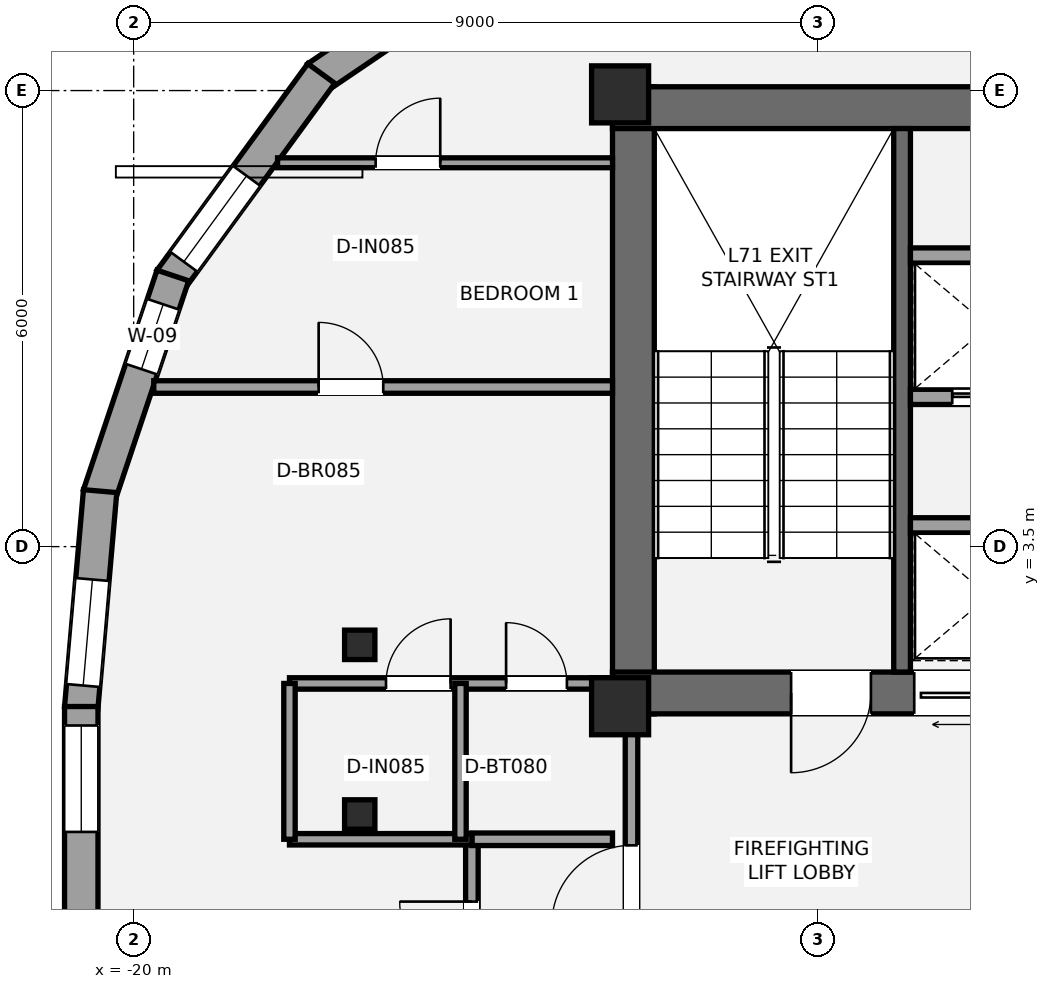
"""IFC4 building model, lengths in metres.
Left out: names, types, materials, properties, quantities, classifications, styles, units other than length and angle.
Written with IfcOpenShell. Run it as: python <this file> out.ifc"""

import sys

from ifc_helpers import new_model, si_unit, direction, frame, frame_2d, origin, origin_2d, place, context, subcontext, project, spatial, rectangle, i_section, extrude, element, fill, save


model = new_model("IFC4")
c1 = context("Model", 3, precision=1e-05, world=origin(), true_north=direction((0.0, 1.0)))
c2 = subcontext(c1, "Body", "Model", "MODEL_VIEW")
j1 = project(units=[si_unit("LENGTHUNIT", "METRE"), si_unit("PLANEANGLEUNIT", "RADIAN")], contexts=[c1])
p1 = place(None, origin())
s1 = spatial("IfcSite", under=j1, at=p1, CompositionType="ELEMENT")
p2 = place(p1, origin())
s2 = spatial("IfcBuilding", under=s1, at=p2, CompositionType="ELEMENT")
p3 = place(p2, frame((0.0, 0.0, 250.95)))
s3 = spatial("IfcBuildingStorey", under=s2, at=p3, CompositionType="ELEMENT", Elevation=250.95)
p4 = place(p3, frame((-13.425, 1.3, 0.0), z_axis=(0.0, 0.0, 1.0), x_axis=(0.0, 1.0, 0.0)))
e1 = element("IfcWall", 1, at=p4, inside=s3, PredefinedType="SHEAR", context=c2, shape_type="SweptSolid", body=[
    extrude(rectangle(XDim=8.25, YDim=0.55, at=frame_2d((4.125, 0.0))), origin(), (0.0, 0.0, 1.0), 3.15),
])
p5 = place(p3, frame((-13.7, 9.275, 0.0), z_axis=(0.0, 0.0, 1.0), x_axis=(1.0, 0.0, 0.0)))
e2 = element("IfcWall", 2, at=p5, inside=s3, PredefinedType="SHEAR", context=c2, shape_type="SweptSolid", body=[
    extrude(rectangle(XDim=9.175, YDim=0.55, at=frame_2d((4.587, 0.0))), origin(), (0.0, 0.0, 1.0), 3.15),
])
p6 = place(p3, frame((-4.925, 1.575, 0.0), z_axis=(0.0, 0.0, 1.0), x_axis=(-1.0, 0.0, 0.0)))
e3 = element("IfcWall", 3, at=p6, inside=s3, PredefinedType="SHEAR", context=c2, shape_type="SweptSolid", body=[
    extrude(rectangle(XDim=8.775, YDim=0.55, at=frame_2d((4.387, 0.0))), origin(), (0.0, 0.0, 1.0), 3.15),
])
p7 = place(p6, frame((5.375, 0.0, 0.0)))
e4 = element("IfcOpeningElement", 4, at=p7, cuts=e3, PredefinedType="OPENING", context=c2, shape_type="SweptSolid", body=[
    extrude(rectangle(XDim=1.05, YDim=2.15, at=frame_2d((0.525, 1.075))), frame((0.0, 0.285, 0.0), z_axis=(0.0, -1.0, 0.0), x_axis=(1.0, 0.0, 0.0)), (0.0, 0.0, 1.0), 0.57),
])
p8 = place(p6, frame((3.705, 0.0, 0.0)))
e5 = element("IfcOpeningElement", 5, at=p8, cuts=e3, PredefinedType="OPENING", context=c2, shape_type="SweptSolid", body=[
    extrude(rectangle(XDim=1.1, YDim=2.2, at=frame_2d((0.55, 1.1))), frame((0.0, 0.285, 0.0), z_axis=(0.0, -1.0, 0.0), x_axis=(1.0, 0.0, 0.0)), (0.0, 0.0, 1.0), 0.57),
])
p9 = place(p3, frame((-9.89, 1.85, 0.0), z_axis=(0.0, 0.0, 1.0), x_axis=(0.0, 1.0, 0.0)))
e6 = element("IfcWall", 6, at=p9, inside=s3, PredefinedType="SHEAR", context=c2, shape_type="SweptSolid", body=[
    extrude(rectangle(XDim=7.15, YDim=0.22, at=frame_2d((3.575, 0.0))), origin(), (0.0, 0.0, 1.0), 3.15),
])
for number, where, z_axis, x_axis in (
    (7, (-13.6, 1.4, 0.0), (0.0, 0.0, 1.0), (1.0, 0.0, 0.0)),
    (8, (-13.6, 9.45, 0.0), (0.0, 0.0, 1.0), (1.0, 0.0, 0.0)),
):
    element("IfcColumn", number, at=place(p3, frame(where, z_axis=z_axis, x_axis=x_axis)), inside=s3, PredefinedType="PILASTER", context=c2, shape_type="SweptSolid", body=[
        extrude(rectangle(XDim=0.75, YDim=0.75, at=origin_2d()), origin(), (0.0, 0.0, 1.0), 3.15),
    ])
for number, where, z_axis, x_axis in (
    (9, (-17.026, 2.208, 0.0), (0.0, 0.0, 1.0), (1.0, 0.0, 0.0)),
    (10, (-17.026, -0.024, 0.0), (0.0, 0.0, 1.0), (1.0, 0.0, 0.0)),
):
    element("IfcColumn", number, at=place(p3, frame(where, z_axis=z_axis, x_axis=x_axis)), inside=s3, PredefinedType="COLUMN", context=c2, shape_type="SweptSolid", body=[
        extrude(i_section(OverallWidth=0.399, OverallDepth=0.387, WebThickness=0.021, FlangeThickness=0.033, at=origin_2d()), origin(), (0.0, 0.0, 1.0), 3.15),
    ])
p10 = place(p3, frame((-17.586, 9.672, 0.0), z_axis=(0.0, 0.0, 1.0), x_axis=(0.827707997274, 0.56115904274, 0.0)))
e11 = element("IfcWall", 11, at=p10, inside=s3, PredefinedType="STANDARD", context=c2, shape_type="SweptSolid", body=[
    extrude(rectangle(XDim=3.837, YDim=0.44, at=frame_2d((1.918, 0.0))), origin(), (0.0, 0.0, 1.0), 2.336),
])
p11 = place(p10, frame((1.44, 0.0, 0.55)))
e12 = element("IfcOpeningElement", 12, at=p11, cuts=e11, PredefinedType="OPENING", context=c2, shape_type="SweptSolid", body=[
    extrude(rectangle(XDim=1.75, YDim=1.55, at=frame_2d((0.875, 0.775))), frame((0.0, 0.23, 0.0), z_axis=(0.0, -1.0, 0.0), x_axis=(1.0, 0.0, 0.0)), (0.0, 0.0, 1.0), 0.46),
])
p12 = place(p3, frame((-19.515, 7.007, 0.0), z_axis=(0.0, 0.0, 1.0), x_axis=(0.589698134284, 0.807623743102, 0.0)))
e13 = element("IfcWall", 13, at=p12, inside=s3, PredefinedType="STANDARD", context=c2, shape_type="SweptSolid", body=[
    extrude(rectangle(XDim=3.364, YDim=0.44, at=frame_2d((1.682, 0.0))), origin(), (0.0, 0.0, 1.0), 2.336),
])
p13 = place(p12, frame((0.298, 0.0, 0.58)))
e14 = element("IfcOpeningElement", 14, at=p13, cuts=e13, PredefinedType="OPENING", context=c2, shape_type="SweptSolid", body=[
    extrude(rectangle(XDim=1.4, YDim=1.55, at=frame_2d((0.7, 0.775))), frame((0.0, 0.23, 0.0), z_axis=(0.0, -1.0, 0.0), x_axis=(1.0, 0.0, 0.0)), (0.0, 0.0, 1.0), 0.46),
])
p14 = place(p3, frame((-20.452, 4.179, 0.0), z_axis=(0.0, 0.0, 1.0), x_axis=(0.317622332961, 0.948217302945, 0.0)))
e15 = element("IfcWall", 15, at=p14, inside=s3, PredefinedType="STANDARD", context=c2, shape_type="SweptSolid", body=[
    extrude(rectangle(XDim=3.045, YDim=0.44, at=frame_2d((1.523, 0.0))), origin(), (0.0, 0.0, 1.0), 2.336),
])
p15 = place(p14, frame((1.746, 0.0, 0.58)))
e16 = element("IfcOpeningElement", 16, at=p15, cuts=e15, PredefinedType="OPENING", context=c2, shape_type="SweptSolid", body=[
    extrude(rectangle(XDim=0.9, YDim=1.35, at=frame_2d((0.45, 0.675))), frame((0.0, 0.23, 0.0), z_axis=(0.0, -1.0, 0.0), x_axis=(1.0, 0.0, 0.0)), (0.0, 0.0, 1.0), 0.46),
])
p16 = place(p3, frame((-20.69, 1.377, 0.0), z_axis=(0.0, 0.0, 1.0), x_axis=(0.086868726907, 0.996219767062, 0.0)))
e17 = element("IfcWall", 17, at=p16, inside=s3, PredefinedType="STANDARD", context=c2, shape_type="SweptSolid", body=[
    extrude(rectangle(XDim=2.864, YDim=0.44, at=frame_2d((1.432, 0.0))), origin(), (0.0, 0.0, 1.0), 2.336),
])
p17 = place(p16, frame((0.297, 0.0, 0.58)))
e18 = element("IfcOpeningElement", 18, at=p17, cuts=e17, PredefinedType="OPENING", context=c2, shape_type="SweptSolid", body=[
    extrude(rectangle(XDim=1.4, YDim=1.55, at=frame_2d((0.7, 0.775))), frame((0.0, 0.23, 0.0), z_axis=(0.0, -1.0, 0.0), x_axis=(1.0, 0.0, 0.0)), (0.0, 0.0, 1.0), 0.46),
])
p18 = place(p3, frame((-20.689, -1.396, 0.0), z_axis=(0.0, 0.0, 1.0), x_axis=(0.0, 1.0, 0.0)))
e19 = element("IfcWall", 19, at=p18, inside=s3, PredefinedType="STANDARD", context=c2, shape_type="SweptSolid", body=[
    extrude(rectangle(XDim=2.792, YDim=0.44, at=frame_2d((1.396, 0.0))), origin(), (0.0, 0.0, 1.0), 2.336),
])
p19 = place(p18, frame((1.143, 0.0, 0.55)))
e20 = element("IfcOpeningElement", 20, at=p19, cuts=e19, PredefinedType="OPENING", context=c2, shape_type="SweptSolid", body=[
    extrude(rectangle(XDim=1.4, YDim=1.55, at=frame_2d((0.7, 0.775))), frame((0.0, 0.23, 0.0), z_axis=(0.0, -1.0, 0.0), x_axis=(1.0, 0.0, 0.0)), (0.0, 0.0, 1.0), 0.46),
])
p20 = place(p3, frame((-13.45, -2.15, 0.0), z_axis=(0.0, 0.0, 1.0), x_axis=(0.0, 1.0, 0.0)))
e21 = element("IfcWall", 21, at=p20, inside=s3, PredefinedType="PARTITIONING", context=c2, shape_type="SweptSolid", body=[
    extrude(rectangle(XDim=3.5, YDim=0.165, at=frame_2d((1.75, 0.0))), origin(), (0.0, 0.0, 1.0), 2.423),
])
p21 = place(p20, frame((0.67, 0.0, 0.0)))
e22 = element("IfcOpeningElement", 22, at=p21, cuts=e21, PredefinedType="OPENING", context=c2, shape_type="SweptSolid", body=[
    extrude(rectangle(XDim=1.05, YDim=2.15, at=frame_2d((0.525, 1.075))), frame((0.0, 0.093, 0.0), z_axis=(0.0, -1.0, 0.0), x_axis=(1.0, 0.0, 0.0)), (0.0, 0.0, 1.0), 0.185),
])
p22 = place(p3, frame((-9.78, 3.78, 0.0), z_axis=(0.0, 0.0, 1.0), x_axis=(1.0, 0.0, 0.0)))
e23 = element("IfcWall", 23, at=p22, inside=s3, PredefinedType="SOLIDWALL", context=c2, shape_type="SweptSolid", body=[
    extrude(rectangle(XDim=4.305, YDim=0.2, at=frame_2d((2.152, 0.0))), origin(), (0.0, 0.0, 1.0), 2.97),
])
p23 = place(p22, frame((2.72, 0.0, 0.0)))
e24 = element("IfcOpeningElement", 24, at=p23, cuts=e23, PredefinedType="OPENING", context=c2, shape_type="SweptSolid", body=[
    extrude(rectangle(XDim=1.1, YDim=2.2, at=frame_2d((0.55, 1.1))), frame((0.0, 0.11, 0.0), z_axis=(0.0, -1.0, 0.0), x_axis=(1.0, 0.0, 0.0)), (0.0, 0.0, 1.0), 0.22),
])
p24 = place(p3, frame((-9.78, 5.47, 0.0), z_axis=(0.0, 0.0, 1.0), x_axis=(1.0, 0.0, 0.0)))
e25 = element("IfcWall", 25, at=p24, inside=s3, PredefinedType="SOLIDWALL", context=c2, shape_type="SweptSolid", body=[
    extrude(rectangle(XDim=4.305, YDim=0.2, at=frame_2d((2.152, 0.0))), origin(), (0.0, 0.0, 1.0), 2.97),
])
p25 = place(p24, frame((0.55, 0.0, 0.0)))
e26 = element("IfcOpeningElement", 26, at=p25, cuts=e25, PredefinedType="OPENING", context=c2, shape_type="SweptSolid", body=[
    extrude(rectangle(XDim=1.1, YDim=2.2, at=frame_2d((0.55, 1.1))), frame((0.0, 0.11, 0.0), z_axis=(0.0, -1.0, 0.0), x_axis=(1.0, 0.0, 0.0)), (0.0, 0.0, 1.0), 0.22),
])
p26 = place(p24, frame((2.72, 0.0, 0.0)))
e27 = element("IfcOpeningElement", 27, at=p26, cuts=e25, PredefinedType="OPENING", context=c2, shape_type="SweptSolid", body=[
    extrude(rectangle(XDim=1.1, YDim=2.2, at=frame_2d((0.55, 1.1))), frame((0.0, 0.11, 0.0), z_axis=(0.0, -1.0, 0.0), x_axis=(1.0, 0.0, 0.0)), (0.0, 0.0, 1.0), 0.22),
])
p27 = place(p3, frame((-9.78, 7.33, 0.0), z_axis=(0.0, 0.0, 1.0), x_axis=(1.0, 0.0, 0.0)))
e28 = element("IfcWall", 28, at=p27, inside=s3, PredefinedType="SOLIDWALL", context=c2, shape_type="SweptSolid", body=[
    extrude(rectangle(XDim=4.305, YDim=0.2, at=frame_2d((2.152, 0.0))), origin(), (0.0, 0.0, 1.0), 2.97),
])
p28 = place(p3, frame((-15.55, -3.95, 0.0), z_axis=(0.0, 0.0, 1.0), x_axis=(0.0, 1.0, 0.0)))
e29 = element("IfcWall", 29, at=p28, inside=s3, PredefinedType="PARTITIONING", context=c2, shape_type="SweptSolid", body=[
    extrude(rectangle(XDim=3.6, YDim=0.165, at=frame_2d((1.8, 0.0))), origin(), (0.0, 0.0, 1.0), 2.357),
])
p29 = place(p28, frame((1.83, 0.0, 0.0)))
e30 = element("IfcOpeningElement", 30, at=p29, cuts=e29, PredefinedType="OPENING", context=c2, shape_type="SweptSolid", body=[
    extrude(rectangle(XDim=0.95, YDim=2.15, at=frame_2d((0.475, 1.075))), frame((0.0, 0.093, 0.0), z_axis=(0.0, -1.0, 0.0), x_axis=(1.0, 0.0, 0.0)), (0.0, 0.0, 1.0), 0.185),
])
p30 = place(p3, frame((-15.55, -0.35, 0.0), z_axis=(0.0, 0.0, 1.0), x_axis=(1.0, 0.0, 0.0)))
e31 = element("IfcWall", 31, at=p30, inside=s3, PredefinedType="PARTITIONING", context=c2, shape_type="SweptSolid", body=[
    extrude(rectangle(XDim=1.85, YDim=0.165, at=frame_2d((0.925, 0.0))), origin(), (0.0, 0.0, 1.0), 2.423),
])
p31 = place(p3, frame((-19.736, 5.6, 0.0), z_axis=(0.0, 0.0, 1.0), x_axis=(1.0, 0.0, 0.0)))
e32 = element("IfcWall", 32, at=p31, inside=s3, PredefinedType="PARTITIONING", context=c2, shape_type="SweptSolid", body=[
    extrude(rectangle(XDim=6.036, YDim=0.165, at=frame_2d((3.018, 0.0))), origin(), (0.0, 0.0, 1.0), 2.423),
])
p32 = place(p31, frame((2.169, 0.0, 0.0)))
e33 = element("IfcOpeningElement", 33, at=p32, cuts=e32, PredefinedType="OPENING", context=c2, shape_type="SweptSolid", body=[
    extrude(rectangle(XDim=0.85, YDim=2.1, at=frame_2d((0.425, 1.05))), frame((0.0, 0.093, 0.0), z_axis=(0.0, -1.0, 0.0), x_axis=(1.0, 0.0, 0.0)), (0.0, 0.0, 1.0), 0.185),
])
p33 = place(p3, frame((-17.95, 1.7, 0.0), z_axis=(0.0, 0.0, 1.0), x_axis=(1.0, 0.0, 0.0)))
e34 = element("IfcWall", 34, at=p33, inside=s3, PredefinedType="PLUMBINGWALL", context=c2, shape_type="SweptSolid", body=[
    extrude(rectangle(XDim=4.25, YDim=0.15, at=frame_2d((2.125, 0.0))), origin(), (0.0, 0.0, 1.0), 2.423),
])
p34 = place(p33, frame((2.85, 0.0, 0.0)))
e35 = element("IfcOpeningElement", 35, at=p34, cuts=e34, PredefinedType="OPENING", context=c2, shape_type="SweptSolid", body=[
    extrude(rectangle(XDim=0.8, YDim=2.1, at=frame_2d((0.4, 1.05))), frame((0.0, 0.085, 0.0), z_axis=(0.0, -1.0, 0.0), x_axis=(1.0, 0.0, 0.0)), (0.0, 0.0, 1.0), 0.17),
])
p35 = place(p33, frame((1.27, 0.0, 0.0)))
e36 = element("IfcOpeningElement", 36, at=p35, cuts=e34, PredefinedType="OPENING", context=c2, shape_type="SweptSolid", body=[
    extrude(rectangle(XDim=0.85, YDim=2.1, at=frame_2d((0.425, 1.05))), frame((0.0, 0.085, 0.0), z_axis=(0.0, -1.0, 0.0), x_axis=(1.0, 0.0, 0.0)), (0.0, 0.0, 1.0), 0.17),
])
p36 = place(p3, frame((-17.95, -0.35, 0.0), z_axis=(0.0, 0.0, 1.0), x_axis=(1.0, 0.0, 0.0)))
e37 = element("IfcWall", 37, at=p36, inside=s3, PredefinedType="PLUMBINGWALL", context=c2, shape_type="SweptSolid", body=[
    extrude(rectangle(XDim=2.4, YDim=0.15, at=frame_2d((1.2, 0.0))), origin(), (0.0, 0.0, 1.0), 2.423),
])
p37 = place(p3, frame((-15.7, -0.35, 0.0), z_axis=(0.0, 0.0, 1.0), x_axis=(0.0, 1.0, 0.0)))
e38 = element("IfcWall", 38, at=p37, inside=s3, PredefinedType="PLUMBINGWALL", context=c2, shape_type="SweptSolid", body=[
    extrude(rectangle(XDim=2.05, YDim=0.15, at=frame_2d((1.025, 0.0))), origin(), (0.0, 0.0, 1.0), 2.97),
])
p38 = place(p3, frame((-17.95, -0.35, 0.0), z_axis=(0.0, 0.0, 1.0), x_axis=(0.0, 1.0, 0.0)))
e39 = element("IfcWall", 39, at=p38, inside=s3, PredefinedType="PLUMBINGWALL", context=c2, shape_type="SweptSolid", body=[
    extrude(rectangle(XDim=2.05, YDim=0.15, at=frame_2d((1.025, 0.0))), origin(), (0.0, 0.0, 1.0), 2.423),
])
p39 = place(p3, frame((-18.107, 8.55, 0.0), z_axis=(0.0, 0.0, 1.0), x_axis=(1.0, 0.0, 0.0)))
e40 = element("IfcWall", 40, at=p39, inside=s3, PredefinedType="PARTITIONING", context=c2, shape_type="SweptSolid", body=[
    extrude(rectangle(XDim=4.407, YDim=0.13, at=frame_2d((2.203, 0.0))), origin(), (0.0, 0.0, 1.0), 2.423),
])
p40 = place(p39, frame((1.29, 0.0, 0.0)))
e41 = element("IfcOpeningElement", 41, at=p40, cuts=e40, PredefinedType="OPENING", context=c2, shape_type="SweptSolid", body=[
    extrude(rectangle(XDim=0.85, YDim=2.1, at=frame_2d((0.425, 1.05))), frame((0.0, 0.075, 0.0), z_axis=(0.0, -1.0, 0.0), x_axis=(1.0, 0.0, 0.0)), (0.0, 0.0, 1.0), 0.15),
])
p41 = place(p13, origin())
e42 = element("IfcWindow", 42, at=p41, inside=s3, PartitioningType="SINGLE_PANEL", PredefinedType="WINDOW", context=c2, shape_type="SweptSolid", body=[
    extrude(rectangle(XDim=1.4, YDim=1.55, at=frame_2d((0.7, 0.775))), frame((0.0, -0.01, 0.0), z_axis=(0.0, -1.0, 0.0), x_axis=(1.0, 0.0, 0.0)), (0.0, 0.0, 1.0), 0.06),
])
fill(e14, e42)
p42 = place(p15, origin())
e43 = element("IfcWindow", 43, at=p42, inside=s3, PartitioningType="SINGLE_PANEL", PredefinedType="WINDOW", context=c2, shape_type="SweptSolid", body=[
    extrude(rectangle(XDim=0.9, YDim=1.35, at=frame_2d((0.45, 0.675))), frame((0.0, -0.01, 0.0), z_axis=(0.0, -1.0, 0.0), x_axis=(1.0, 0.0, 0.0)), (0.0, 0.0, 1.0), 0.06),
])
fill(e16, e43)
p43 = place(p17, origin())
e44 = element("IfcWindow", 44, at=p43, inside=s3, PartitioningType="SINGLE_PANEL", PredefinedType="WINDOW", context=c2, shape_type="SweptSolid", body=[
    extrude(rectangle(XDim=1.4, YDim=1.55, at=frame_2d((0.7, 0.775))), frame((0.0, -0.01, 0.0), z_axis=(0.0, -1.0, 0.0), x_axis=(1.0, 0.0, 0.0)), (0.0, 0.0, 1.0), 0.06),
])
fill(e18, e44)
p44 = place(p19, origin())
e45 = element("IfcWindow", 45, at=p44, inside=s3, PartitioningType="SINGLE_PANEL", PredefinedType="WINDOW", context=c2, shape_type="SweptSolid", body=[
    extrude(rectangle(XDim=1.4, YDim=1.55, at=frame_2d((0.7, 0.775))), frame((0.0, -0.01, 0.0), z_axis=(0.0, -1.0, 0.0), x_axis=(1.0, 0.0, 0.0)), (0.0, 0.0, 1.0), 0.06),
])
fill(e20, e45)
p45 = place(p7, origin())
e46 = element("IfcDoor", 46, at=p45, inside=s3, OperationType="SINGLE_SWING_RIGHT", PredefinedType="DOOR", context=c2, shape_type="SweptSolid", body=[
    extrude(rectangle(XDim=1.05, YDim=2.15, at=frame_2d((0.525, 1.075))), frame((0.0, 0.025, 0.0), z_axis=(0.0, -1.0, 0.0), x_axis=(1.0, 0.0, 0.0)), (0.0, 0.0, 1.0), 0.05),
])
fill(e4, e46)
p46 = place(p21, origin())
e47 = element("IfcDoor", 47, at=p46, inside=s3, OperationType="SINGLE_SWING_LEFT", PredefinedType="DOOR", context=c2, shape_type="SweptSolid", body=[
    extrude(rectangle(XDim=1.05, YDim=2.15, at=frame_2d((0.525, 1.075))), frame((0.0, 0.025, 0.0), z_axis=(0.0, -1.0, 0.0), x_axis=(1.0, 0.0, 0.0)), (0.0, 0.0, 1.0), 0.05),
])
fill(e22, e47)
p47 = place(p8, origin())
e48 = element("IfcDoor", 48, at=p47, inside=s3, OperationType="SLIDING_TO_LEFT", PredefinedType="DOOR", context=c2, shape_type="SweptSolid", body=[
    extrude(rectangle(XDim=1.1, YDim=2.2, at=frame_2d((0.55, 1.1))), frame((0.0, 0.025, 0.0), z_axis=(0.0, -1.0, 0.0), x_axis=(1.0, 0.0, 0.0)), (0.0, 0.0, 1.0), 0.05),
])
fill(e5, e48)
p48 = place(p25, origin())
e49 = element("IfcDoor", 49, at=p48, inside=s3, OperationType="SLIDING_TO_LEFT", PredefinedType="DOOR", context=c2, shape_type="SweptSolid", body=[
    extrude(rectangle(XDim=1.1, YDim=2.2, at=frame_2d((0.55, 1.1))), frame((0.0, 0.025, 0.0), z_axis=(0.0, -1.0, 0.0), x_axis=(1.0, 0.0, 0.0)), (0.0, 0.0, 1.0), 0.05),
])
fill(e26, e49)
p49 = place(p29, origin())
e50 = element("IfcDoor", 50, at=p49, inside=s3, OperationType="SINGLE_SWING_RIGHT", PredefinedType="DOOR", context=c2, shape_type="SweptSolid", body=[
    extrude(rectangle(XDim=0.95, YDim=2.15, at=frame_2d((0.475, 1.075))), frame((0.0, 0.025, 0.0), z_axis=(0.0, -1.0, 0.0), x_axis=(1.0, 0.0, 0.0)), (0.0, 0.0, 1.0), 0.05),
])
fill(e30, e50)
p50 = place(p34, origin())
e51 = element("IfcDoor", 51, at=p50, inside=s3, OperationType="SINGLE_SWING_LEFT", PredefinedType="DOOR", context=c2, shape_type="SweptSolid", body=[
    extrude(rectangle(XDim=0.8, YDim=2.1, at=frame_2d((0.4, 1.05))), frame((0.0, 0.025, 0.0), z_axis=(0.0, -1.0, 0.0), x_axis=(1.0, 0.0, 0.0)), (0.0, 0.0, 1.0), 0.05),
])
fill(e35, e51)
p51 = place(p35, origin())
e52 = element("IfcDoor", 52, at=p51, inside=s3, OperationType="SINGLE_SWING_RIGHT", PredefinedType="DOOR", context=c2, shape_type="SweptSolid", body=[
    extrude(rectangle(XDim=0.85, YDim=2.1, at=frame_2d((0.425, 1.05))), frame((0.0, 0.025, 0.0), z_axis=(0.0, -1.0, 0.0), x_axis=(1.0, 0.0, 0.0)), (0.0, 0.0, 1.0), 0.05),
])
fill(e36, e52)
p52 = place(p32, origin())
e53 = element("IfcDoor", 53, at=p52, inside=s3, OperationType="SINGLE_SWING_LEFT", PredefinedType="DOOR", context=c2, shape_type="SweptSolid", body=[
    extrude(rectangle(XDim=0.85, YDim=2.1, at=frame_2d((0.425, 1.05))), frame((0.0, 0.025, 0.0), z_axis=(0.0, -1.0, 0.0), x_axis=(1.0, 0.0, 0.0)), (0.0, 0.0, 1.0), 0.05),
])
fill(e33, e53)
p53 = place(p40, origin())
e54 = element("IfcDoor", 54, at=p53, inside=s3, OperationType="SINGLE_SWING_RIGHT", PredefinedType="DOOR", context=c2, shape_type="SweptSolid", body=[
    extrude(rectangle(XDim=0.85, YDim=2.1, at=frame_2d((0.425, 1.05))), frame((0.0, 0.025, 0.0), z_axis=(0.0, -1.0, 0.0), x_axis=(1.0, 0.0, 0.0)), (0.0, 0.0, 1.0), 0.05),
])
fill(e41, e54)
save(model, sys.argv[1])
